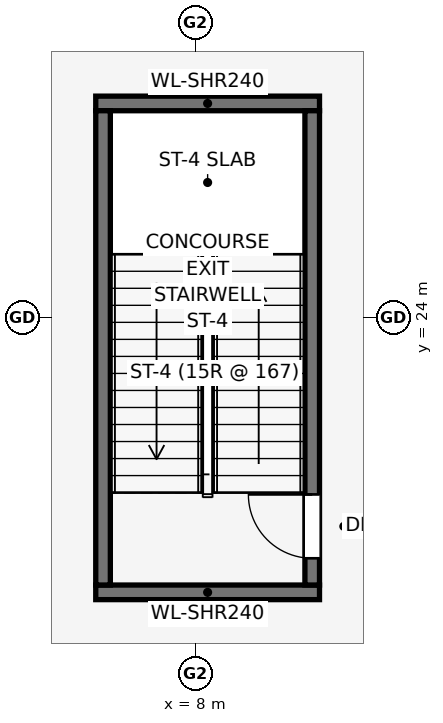
"""IFC4 building model, lengths in metres.
Left out: names, types, materials, properties, quantities, classifications, styles, units other than length and angle.
Written with IfcOpenShell. Run it as: python <this file> out.ifc"""

import sys

from ifc_helpers import new_model, si_unit, direction, frame, frame_2d, origin, place, context, subcontext, project, spatial, rectangle, extrude, element, fill, save


model = new_model("IFC4")
c1 = context("Model", 3, precision=1e-05, world=origin(), true_north=direction((0.0, 1.0)))
c2 = subcontext(c1, "Body", "Model", "MODEL_VIEW")
j1 = project(units=[si_unit("LENGTHUNIT", "METRE"), si_unit("PLANEANGLEUNIT", "RADIAN")], contexts=[c1])
p1 = place(None, origin())
s1 = spatial("IfcSite", under=j1, at=p1, CompositionType="ELEMENT")
p2 = place(p1, origin())
s2 = spatial("IfcBuilding", under=s1, at=p2, CompositionType="ELEMENT")
p3 = place(p2, frame((0.0, 0.0, 11.0)))
s3 = spatial("IfcBuildingStorey", under=s2, at=p3, CompositionType="ELEMENT", Elevation=11.0)
for number, where, z_axis, x_axis in (
    (1, (6.36, 19.48, 0.0), (0.0, 0.0, 1.0), (1.0, 0.0, 0.0)),
    (2, (10.04, 27.52, 0.0), (0.0, 0.0, 1.0), (-1.0, 0.0, 0.0)),
):
    element("IfcWall", number, at=place(p3, frame(where, z_axis=z_axis, x_axis=x_axis)), inside=s3, PredefinedType="SHEAR", context=c2, shape_type="SweptSolid", body=[
        extrude(rectangle(XDim=3.68, YDim=0.24, at=frame_2d((1.84, 0.0))), origin(), (0.0, 0.0, 1.0), 5.0),
    ])
p4 = place(p3, frame((6.48, 27.4, 0.0), z_axis=(0.0, 0.0, 1.0), x_axis=(0.0, -1.0, 0.0)))
e3 = element("IfcWall", 3, at=p4, inside=s3, PredefinedType="SHEAR", context=c2, shape_type="SweptSolid", body=[
    extrude(rectangle(XDim=7.8, YDim=0.24, at=frame_2d((3.9, 0.0))), origin(), (0.0, 0.0, 1.0), 5.0),
])
p5 = place(p3, frame((9.92, 19.6, 0.0), z_axis=(0.0, 0.0, 1.0), x_axis=(0.0, 1.0, 0.0)))
e4 = element("IfcWall", 4, at=p5, inside=s3, PredefinedType="SHEAR", context=c2, shape_type="SweptSolid", body=[
    extrude(rectangle(XDim=7.8, YDim=0.24, at=frame_2d((3.9, 0.0))), origin(), (0.0, 0.0, 1.0), 5.0),
])
p6 = place(p5, frame((0.44, 0.0, 0.0)))
e5 = element("IfcOpeningElement", 5, at=p6, cuts=e4, PredefinedType="OPENING", context=c2, shape_type="SweptSolid", body=[
    extrude(rectangle(XDim=1.05, YDim=2.0, at=frame_2d((0.525, 1.0))), frame((0.0, 0.13, 0.0), z_axis=(0.0, -1.0, 0.0), x_axis=(1.0, 0.0, 0.0)), (0.0, 0.0, 1.0), 0.26),
])
p7 = place(p6, origin())
e6 = element("IfcDoor", 6, at=p7, inside=s3, OperationType="SINGLE_SWING_RIGHT", PredefinedType="DOOR", context=c2, shape_type="SweptSolid", body=[
    extrude(rectangle(XDim=1.05, YDim=2.0, at=frame_2d((0.525, 1.0))), frame((0.0, 0.025, 0.0), z_axis=(0.0, -1.0, 0.0), x_axis=(1.0, 0.0, 0.0)), (0.0, 0.0, 1.0), 0.05),
])
fill(e5, e6)
save(model, sys.argv[1])
